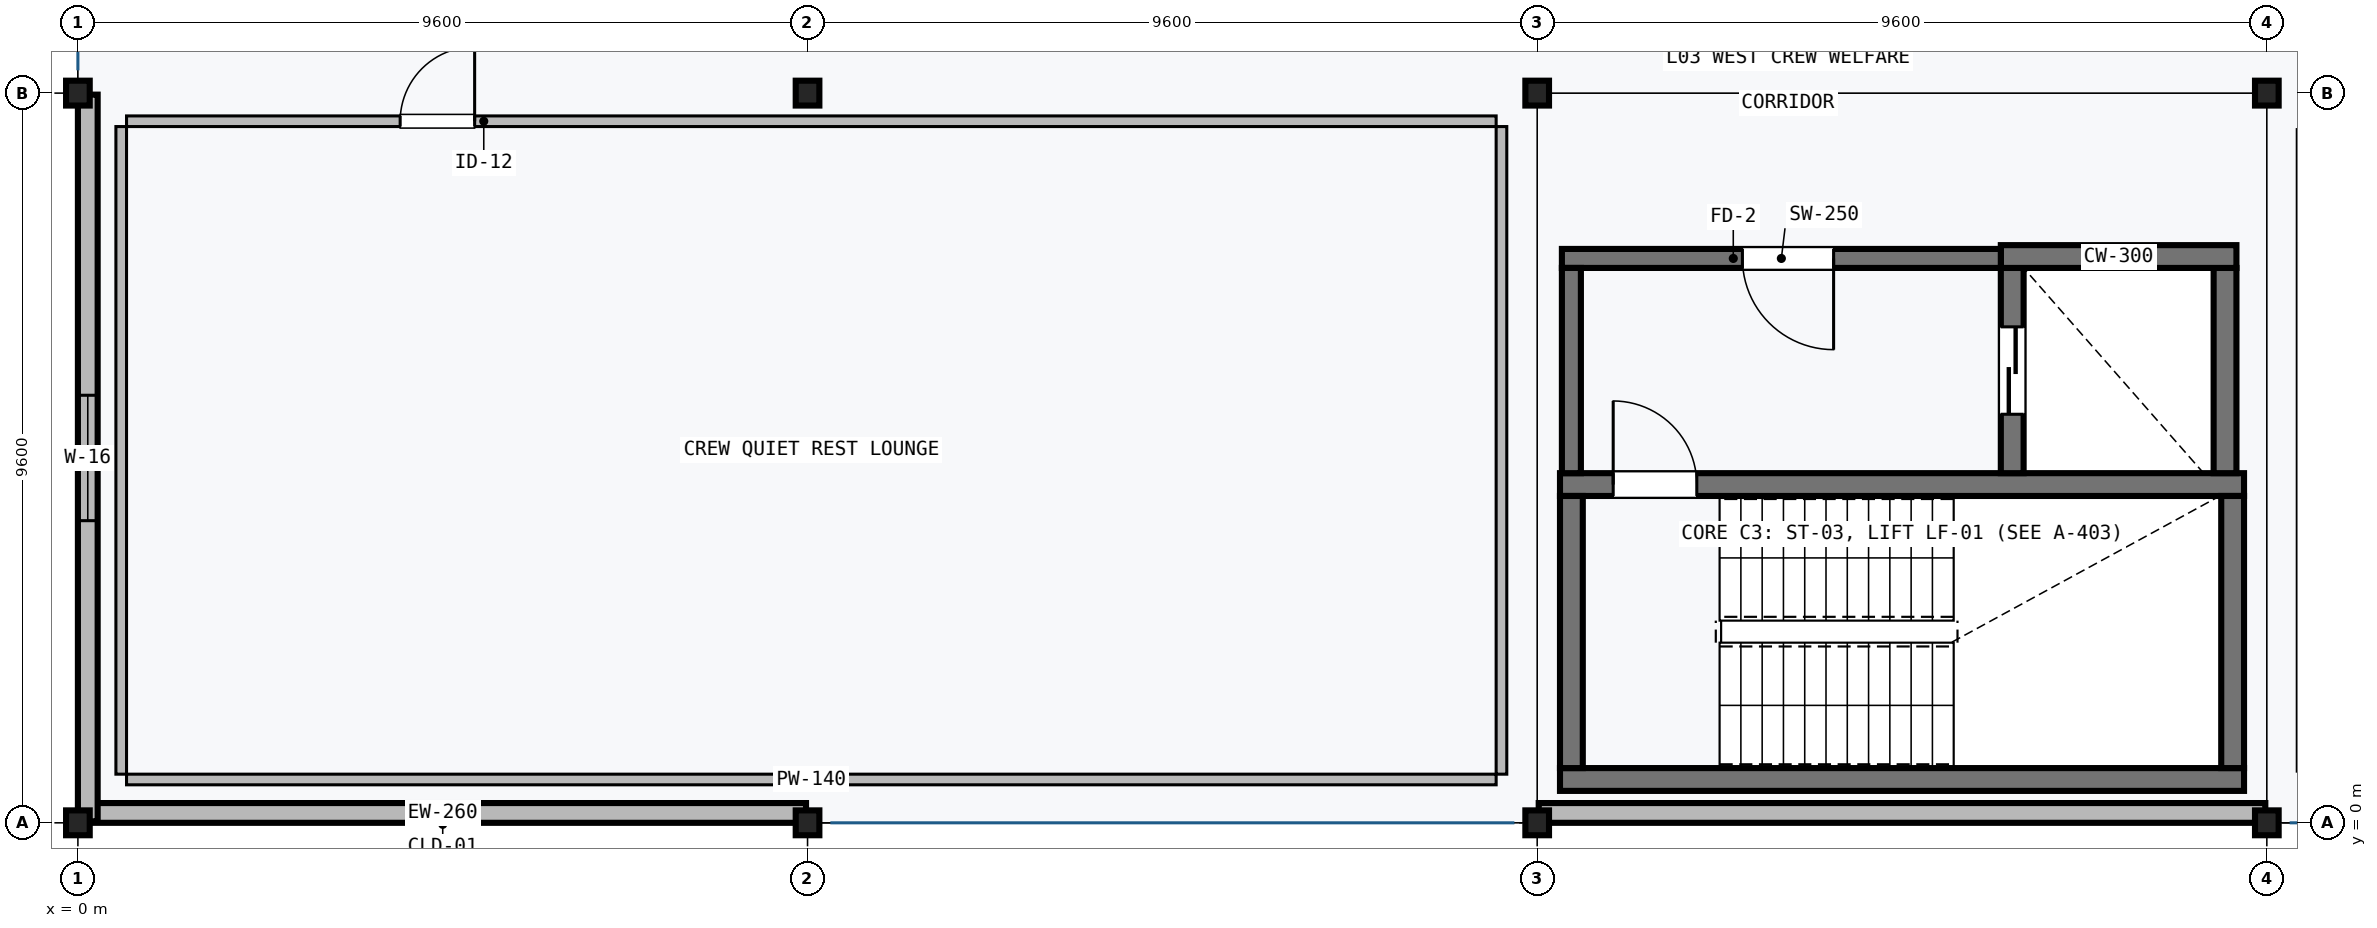
"""IFC4 building model, lengths in metres.
Left out: names, types, materials, properties, quantities, classifications, styles, units other than length and angle.
Written with IfcOpenShell. Run it as: python <this file> out.ifc"""

import sys

from ifc_helpers import new_model, si_unit, direction, frame, frame_2d, origin, origin_2d, place, context, subcontext, project, spatial, rectangle, i_section, extrude, element, fill, save


model = new_model("IFC4")
c1 = context("Model", 3, precision=1e-05, world=origin(), true_north=direction((0.0, 1.0)))
c2 = subcontext(c1, "Body", "Model", "MODEL_VIEW")
j1 = project(units=[si_unit("LENGTHUNIT", "METRE"), si_unit("PLANEANGLEUNIT", "RADIAN")], contexts=[c1])
p1 = place(None, origin())
s1 = spatial("IfcSite", under=j1, at=p1, CompositionType="ELEMENT")
p2 = place(p1, origin())
s2 = spatial("IfcBuilding", under=s1, at=p2, CompositionType="ELEMENT")
p3 = place(p2, frame((0.0, 0.0, 14.7)))
s3 = spatial("IfcBuildingStorey", under=s2, at=p3, CompositionType="ELEMENT", Elevation=14.7)
for number, where, z_axis, x_axis in (
    (1, (0.0, 0.0, 0.0), (0.0, 0.0, 1.0), (1.0, 0.0, 0.0)),
    (2, (0.0, 9.6, 0.0), (0.0, 0.0, 1.0), (1.0, 0.0, 0.0)),
    (3, (9.6, 0.0, 0.0), (0.0, 0.0, 1.0), (1.0, 0.0, 0.0)),
    (4, (9.6, 9.6, 0.0), (0.0, 0.0, 1.0), (1.0, 0.0, 0.0)),
    (5, (19.2, 0.0, 0.0), (0.0, 0.0, 1.0), (1.0, 0.0, 0.0)),
    (6, (19.2, 9.6, 0.0), (0.0, 0.0, 1.0), (1.0, 0.0, 0.0)),
    (7, (28.8, 0.0, 0.0), (0.0, 0.0, 1.0), (1.0, 0.0, 0.0)),
    (8, (28.8, 9.6, 0.0), (0.0, 0.0, 1.0), (1.0, 0.0, 0.0)),
):
    element("IfcColumn", number, at=place(p3, frame(where, z_axis=z_axis, x_axis=x_axis)), inside=s3, PredefinedType="COLUMN", context=c2, shape_type="SweptSolid", body=[
        extrude(i_section(OverallWidth=0.311, OverallDepth=0.327, WebThickness=0.016, FlangeThickness=0.025, FilletRadius=0.015, at=origin_2d()), origin(), (0.0, 0.0, 1.0), 3.95),
    ])
p4 = place(p3, frame((19.5, 0.57, 0.0), z_axis=(0.0, 0.0, 1.0), x_axis=(1.0, 0.0, 0.0)))
e9 = element("IfcWall", 9, at=p4, inside=s3, PredefinedType="SHEAR", context=c2, shape_type="SweptSolid", body=[
    extrude(rectangle(XDim=9.0, YDim=0.3, at=frame_2d((4.5, 0.0))), origin(), (0.0, 0.0, 1.0), 3.95),
])
p5 = place(p3, frame((28.5, 4.45, 0.0), z_axis=(0.0, 0.0, 1.0), x_axis=(-1.0, 0.0, 0.0)))
e10 = element("IfcWall", 10, at=p5, inside=s3, PredefinedType="SHEAR", context=c2, shape_type="SweptSolid", body=[
    extrude(rectangle(XDim=9.0, YDim=0.3, at=frame_2d((4.5, 0.0))), origin(), (0.0, 0.0, 1.0), 3.95),
])
p6 = place(p5, frame((7.2, 0.0, 0.0)))
e11 = element("IfcOpeningElement", 11, at=p6, cuts=e10, PredefinedType="OPENING", context=c2, shape_type="SweptSolid", body=[
    extrude(rectangle(XDim=1.1, YDim=2.15, at=frame_2d((0.55, 1.075))), frame((0.0, 0.16, 0.0), z_axis=(0.0, -1.0, 0.0), x_axis=(1.0, 0.0, 0.0)), (0.0, 0.0, 1.0), 0.32),
])
for number, where, z_axis, x_axis in (
    (12, (19.65, 0.72, 0.0), (0.0, 0.0, 1.0), (0.0, 1.0, 0.0)),
    (13, (28.35, 4.3, 0.0), (0.0, 0.0, 1.0), (0.0, -1.0, 0.0)),
):
    element("IfcWall", number, at=place(p3, frame(where, z_axis=z_axis, x_axis=x_axis)), inside=s3, PredefinedType="SHEAR", context=c2, shape_type="SweptSolid", body=[
        extrude(rectangle(XDim=3.58, YDim=0.3, at=frame_2d((1.79, 0.0))), origin(), (0.0, 0.0, 1.0), 3.95),
    ])
p7 = place(p3, frame((25.45, 7.3, 0.0), z_axis=(0.0, 0.0, 1.0), x_axis=(0.0, -1.0, 0.0)))
e14 = element("IfcWall", 14, at=p7, inside=s3, PredefinedType="SHEAR", context=c2, shape_type="SweptSolid", body=[
    extrude(rectangle(XDim=2.7, YDim=0.3, at=frame_2d((1.35, 0.0))), origin(), (0.0, 0.0, 1.0), 3.95),
])
p8 = place(p7, frame((0.775, 0.0, 0.0)))
e15 = element("IfcOpeningElement", 15, at=p8, cuts=e14, PredefinedType="OPENING", context=c2, shape_type="SweptSolid", body=[
    extrude(rectangle(XDim=1.15, YDim=2.1, at=frame_2d((0.575, 1.05))), frame((0.0, 0.16, 0.0), z_axis=(0.0, -1.0, 0.0), x_axis=(1.0, 0.0, 0.0)), (0.0, 0.0, 1.0), 0.32),
])
p9 = place(p3, frame((28.25, 4.6, 0.0), z_axis=(0.0, 0.0, 1.0), x_axis=(0.0, 1.0, 0.0)))
e16 = element("IfcWall", 16, at=p9, inside=s3, PredefinedType="SHEAR", context=c2, shape_type="SweptSolid", body=[
    extrude(rectangle(XDim=2.7, YDim=0.3, at=frame_2d((1.35, 0.0))), origin(), (0.0, 0.0, 1.0), 3.95),
])
p10 = place(p3, frame((25.3, 7.45, 0.0), z_axis=(0.0, 0.0, 1.0), x_axis=(1.0, 0.0, 0.0)))
e17 = element("IfcWall", 17, at=p10, inside=s3, PredefinedType="SHEAR", context=c2, shape_type="SweptSolid", body=[
    extrude(rectangle(XDim=3.1, YDim=0.3, at=frame_2d((1.55, 0.0))), origin(), (0.0, 0.0, 1.0), 3.95),
])
p11 = place(p3, frame((25.3, 7.425, 0.0), z_axis=(0.0, 0.0, 1.0), x_axis=(-1.0, 0.0, 0.0)))
e18 = element("IfcWall", 18, at=p11, inside=s3, PredefinedType="SHEAR", context=c2, shape_type="SweptSolid", body=[
    extrude(rectangle(XDim=5.775, YDim=0.25, at=frame_2d((2.888, 0.0))), origin(), (0.0, 0.0, 1.0), 3.95),
])
p12 = place(p11, frame((2.2, 0.0, 0.0)))
e19 = element("IfcOpeningElement", 19, at=p12, cuts=e18, PredefinedType="OPENING", context=c2, shape_type="SweptSolid", body=[
    extrude(rectangle(XDim=1.2, YDim=2.15, at=frame_2d((0.6, 1.075))), frame((0.0, 0.135, 0.0), z_axis=(0.0, -1.0, 0.0), x_axis=(1.0, 0.0, 0.0)), (0.0, 0.0, 1.0), 0.27),
])
p13 = place(p3, frame((19.65, 4.6, 0.0), z_axis=(0.0, 0.0, 1.0), x_axis=(0.0, 1.0, 0.0)))
e20 = element("IfcWall", 20, at=p13, inside=s3, PredefinedType="SHEAR", context=c2, shape_type="SweptSolid", body=[
    extrude(rectangle(XDim=2.7, YDim=0.25, at=frame_2d((1.35, 0.0))), origin(), (0.0, 0.0, 1.0), 3.95),
])
p14 = place(p3, frame((9.58, 0.13, 0.0), z_axis=(0.0, 0.0, 1.0), x_axis=(-1.0, 0.0, 0.0)))
e21 = element("IfcWall", 21, at=p14, inside=s3, PredefinedType="SOLIDWALL", context=c2, shape_type="SweptSolid", body=[
    extrude(rectangle(XDim=9.56, YDim=0.26, at=frame_2d((4.78, 0.0))), origin(), (0.0, 0.0, 1.0), 3.66),
])
p15 = place(p3, frame((0.13, 0.02, 0.0), z_axis=(0.0, 0.0, 1.0), x_axis=(0.0, 1.0, 0.0)))
e22 = element("IfcWall", 22, at=p15, inside=s3, PredefinedType="SOLIDWALL", context=c2, shape_type="SweptSolid", body=[
    extrude(rectangle(XDim=9.56, YDim=0.26, at=frame_2d((4.78, 0.0))), origin(), (0.0, 0.0, 1.0), 3.493),
])
p16 = place(p15, frame((3.955, 0.0, 0.9)))
e23 = element("IfcOpeningElement", 23, at=p16, cuts=e22, PredefinedType="OPENING", context=c2, shape_type="SweptSolid", body=[
    extrude(rectangle(XDim=1.65, YDim=1.5, at=frame_2d((0.825, 0.75))), frame((0.0, 0.14, 0.0), z_axis=(0.0, -1.0, 0.0), x_axis=(1.0, 0.0, 0.0)), (0.0, 0.0, 1.0), 0.28),
])
p17 = place(p3, frame((28.78, 0.13, 0.0), z_axis=(0.0, 0.0, 1.0), x_axis=(-1.0, 0.0, 0.0)))
e24 = element("IfcWall", 24, at=p17, inside=s3, PredefinedType="SOLIDWALL", context=c2, shape_type="SweptSolid", body=[
    extrude(rectangle(XDim=9.56, YDim=0.26, at=frame_2d((4.78, 0.0))), origin(), (0.0, 0.0, 1.0), 3.66),
])
p18 = place(p3, frame((18.66, 0.57, 0.0), z_axis=(0.0, 0.0, 1.0), x_axis=(-1.0, 0.0, 0.0)))
e25 = element("IfcWall", 25, at=p18, inside=s3, PredefinedType="PARTITIONING", context=c2, shape_type="SweptSolid", body=[
    extrude(rectangle(XDim=18.02, YDim=0.14, at=frame_2d((9.01, 0.0))), origin(), (0.0, 0.0, 1.0), 3.483),
])
p19 = place(p3, frame((0.64, 9.23, 0.0), z_axis=(0.0, 0.0, 1.0), x_axis=(1.0, 0.0, 0.0)))
e26 = element("IfcWall", 26, at=p19, inside=s3, PredefinedType="PARTITIONING", context=c2, shape_type="SweptSolid", body=[
    extrude(rectangle(XDim=18.02, YDim=0.14, at=frame_2d((9.01, 0.0))), origin(), (0.0, 0.0, 1.0), 3.483),
])
p20 = place(p19, frame((3.6, 0.0, 0.0)))
e27 = element("IfcOpeningElement", 27, at=p20, cuts=e26, PredefinedType="OPENING", context=c2, shape_type="SweptSolid", body=[
    extrude(rectangle(XDim=0.98, YDim=2.15, at=frame_2d((0.49, 1.075))), frame((0.0, 0.08, 0.0), z_axis=(0.0, -1.0, 0.0), x_axis=(1.0, 0.0, 0.0)), (0.0, 0.0, 1.0), 0.16),
])
for number, where, z_axis, x_axis in (
    (28, (0.57, 0.64, 0.0), (0.0, 0.0, 1.0), (0.0, 1.0, 0.0)),
    (29, (18.73, 9.16, 0.0), (0.0, 0.0, 1.0), (0.0, -1.0, 0.0)),
):
    element("IfcWall", number, at=place(p3, frame(where, z_axis=z_axis, x_axis=x_axis)), inside=s3, PredefinedType="PARTITIONING", context=c2, shape_type="SweptSolid", body=[
        extrude(rectangle(XDim=8.52, YDim=0.14, at=frame_2d((4.26, 0.0))), origin(), (0.0, 0.0, 1.0), 3.59),
    ])
p21 = place(p6, frame((1.1, 0.0, 0.0), z_axis=(0.0, 0.0, 1.0), x_axis=(-1.0, 0.0, 0.0)))
e30 = element("IfcDoor", 30, at=p21, inside=s3, OperationType="SINGLE_SWING_RIGHT", PredefinedType="DOOR", context=c2, shape_type="SweptSolid", body=[
    extrude(rectangle(XDim=1.1, YDim=2.15, at=frame_2d((0.55, 1.075))), frame((0.0, 0.025, 0.0), z_axis=(0.0, -1.0, 0.0), x_axis=(1.0, 0.0, 0.0)), (0.0, 0.0, 1.0), 0.05),
])
fill(e11, e30)
p22 = place(p8, frame((1.15, 0.0, 0.0), z_axis=(0.0, 0.0, 1.0), x_axis=(-1.0, 0.0, 0.0)))
e31 = element("IfcDoor", 31, at=p22, inside=s3, OperationType="DOUBLE_DOOR_SLIDING", PredefinedType="DOOR", context=c2, shape_type="SweptSolid", body=[
    extrude(rectangle(XDim=1.15, YDim=2.1, at=frame_2d((0.575, 1.05))), frame((0.0, 0.025, 0.0), z_axis=(0.0, -1.0, 0.0), x_axis=(1.0, 0.0, 0.0)), (0.0, 0.0, 1.0), 0.05),
])
fill(e15, e31)
p23 = place(p12, origin())
e32 = element("IfcDoor", 32, at=p23, inside=s3, OperationType="SINGLE_SWING_LEFT", PredefinedType="DOOR", context=c2, shape_type="SweptSolid", body=[
    extrude(rectangle(XDim=1.2, YDim=2.15, at=frame_2d((0.6, 1.075))), frame((0.0, 0.025, 0.0), z_axis=(0.0, -1.0, 0.0), x_axis=(1.0, 0.0, 0.0)), (0.0, 0.0, 1.0), 0.05),
])
fill(e19, e32)
p24 = place(p16, origin())
e33 = element("IfcWindow", 33, at=p24, inside=s3, PartitioningType="SINGLE_PANEL", PredefinedType="WINDOW", context=c2, shape_type="SweptSolid", body=[
    extrude(rectangle(XDim=1.65, YDim=1.5, at=frame_2d((0.825, 0.75))), frame((0.0, 0.03, 0.0), z_axis=(0.0, -1.0, 0.0), x_axis=(1.0, 0.0, 0.0)), (0.0, 0.0, 1.0), 0.06),
])
fill(e23, e33)
p25 = place(p20, origin())
e34 = element("IfcDoor", 34, at=p25, inside=s3, OperationType="SINGLE_SWING_RIGHT", PredefinedType="DOOR", context=c2, shape_type="SweptSolid", body=[
    extrude(rectangle(XDim=0.98, YDim=2.15, at=frame_2d((0.49, 1.075))), frame((0.0, 0.025, 0.0), z_axis=(0.0, -1.0, 0.0), x_axis=(1.0, 0.0, 0.0)), (0.0, 0.0, 1.0), 0.05),
])
fill(e27, e34)
save(model, sys.argv[1])
